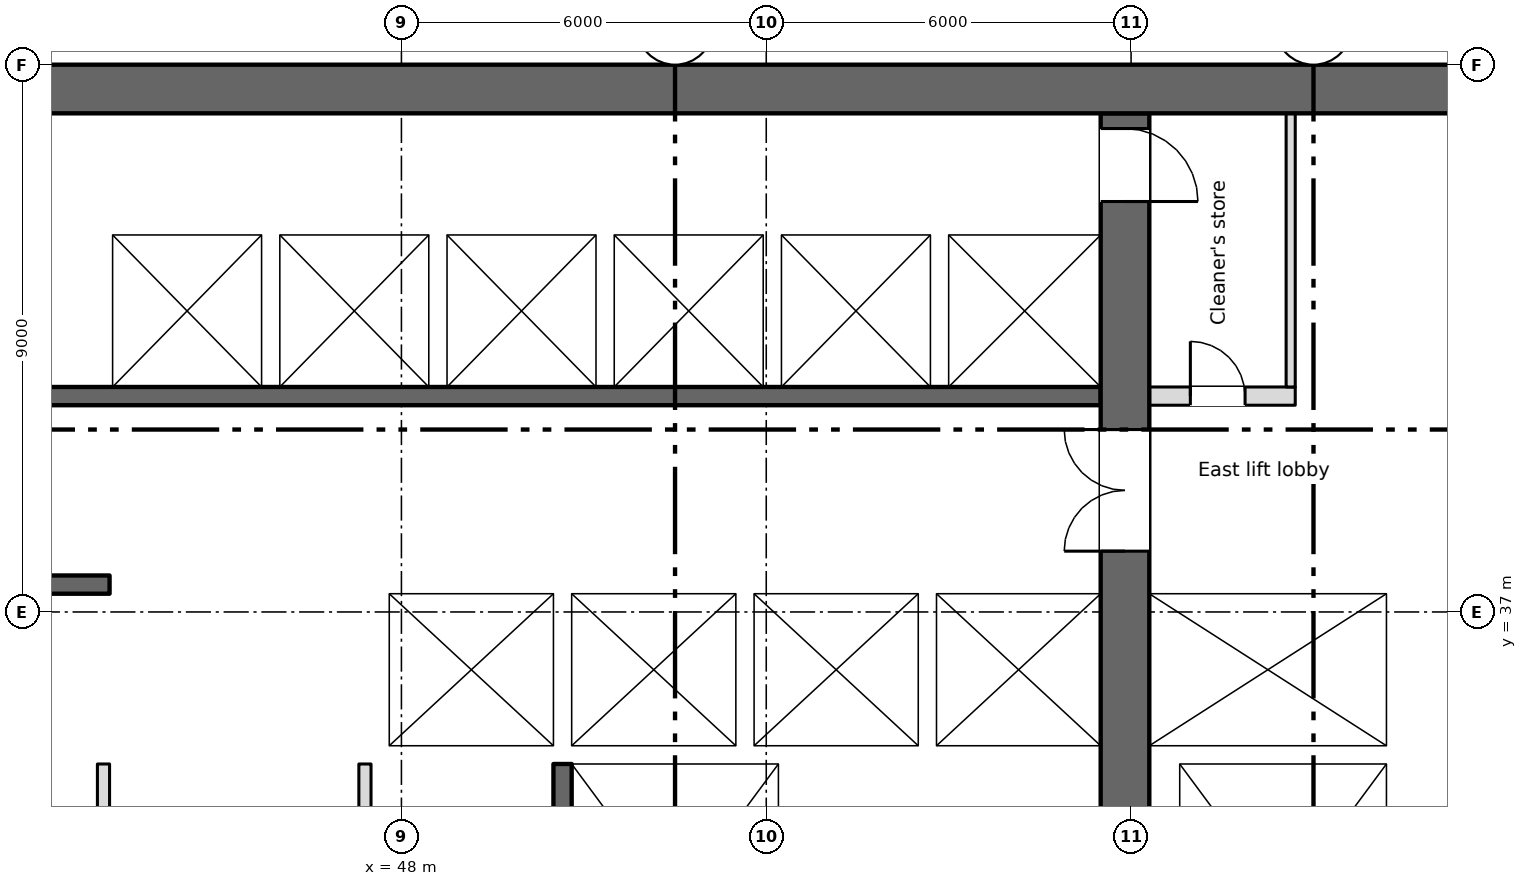
"""IFC4 building model, lengths in metres.
Left out: names, types, materials, properties, quantities, classifications, styles, units other than length and angle.
Written with IfcOpenShell. Run it as: python <this file> out.ifc"""

import sys

from ifc_helpers import new_model, si_unit, direction, frame, frame_2d, origin, place, context, subcontext, project, spatial, rectangle, extrude, element, fill, save


model = new_model("IFC4")
c1 = context("Model", 3, precision=1e-05, world=origin(), true_north=direction((0.0, 1.0)))
c2 = subcontext(c1, "Body", "Model", "MODEL_VIEW")
j1 = project(units=[si_unit("LENGTHUNIT", "METRE"), si_unit("PLANEANGLEUNIT", "RADIAN")], contexts=[c1])
p1 = place(None, origin())
s1 = spatial("IfcSite", under=j1, at=p1, CompositionType="ELEMENT")
p2 = place(p1, origin())
s2 = spatial("IfcBuilding", under=s1, at=p2, CompositionType="ELEMENT")
p3 = place(p2, frame((0.0, 0.0, 110.0)))
s3 = spatial("IfcBuildingStorey", under=s2, at=p3, CompositionType="ELEMENT", Elevation=110.0)
p4 = place(p3, frame((5.55, 45.6, 0.0), z_axis=(0.0, 0.0, 1.0), x_axis=(1.0, 0.0, 0.0)))
e1 = element("IfcWall", 1, at=p4, inside=s3, PredefinedType="SHEAR", context=c2, shape_type="SweptSolid", body=[
    extrude(rectangle(XDim=60.9, YDim=0.8, at=frame_2d((30.45, 0.0))), origin(), (0.0, 0.0, 1.0), 3.35),
])
p5 = place(p4, frame((1.2, 0.0, 0.6)))
e2 = element("IfcOpeningElement", 2, at=p5, cuts=e1, PredefinedType="OPENING", context=c2, shape_type="SweptSolid", body=[
    extrude(rectangle(XDim=0.6, YDim=2.4, at=frame_2d((0.3, 1.2))), frame((0.0, 0.41, 0.0), z_axis=(0.0, -1.0, 0.0), x_axis=(1.0, 0.0, 0.0)), (0.0, 0.0, 1.0), 0.82),
])
p6 = place(p4, frame((7.2, 0.0, 0.6)))
e3 = element("IfcOpeningElement", 3, at=p6, cuts=e1, PredefinedType="OPENING", context=c2, shape_type="SweptSolid", body=[
    extrude(rectangle(XDim=0.6, YDim=2.4, at=frame_2d((0.3, 1.2))), frame((0.0, 0.41, 0.0), z_axis=(0.0, -1.0, 0.0), x_axis=(1.0, 0.0, 0.0)), (0.0, 0.0, 1.0), 0.82),
])
p7 = place(p3, frame((64.35, 34.8, 0.0), z_axis=(0.0, 0.0, 1.0), x_axis=(0.0, 1.0, 0.0)))
e4 = element("IfcWall", 4, at=p7, inside=s3, PredefinedType="SHEAR", context=c2, shape_type="SweptSolid", body=[
    extrude(rectangle(XDim=10.4, YDim=0.3, at=frame_2d((5.2, 0.0))), origin(), (0.0, 0.0, 1.0), 3.35),
])
p8 = place(p3, frame((59.9, 28.4, 0.0), z_axis=(0.0, 0.0, 1.0), x_axis=(0.0, 1.0, 0.0)))
e5 = element("IfcWall", 5, at=p8, inside=s3, PredefinedType="SHEAR", context=c2, shape_type="SweptSolid", body=[
    extrude(rectangle(XDim=16.8, YDim=0.8, at=frame_2d((8.4, 0.0))), origin(), (0.0, 0.0, 1.0), 3.35),
])
p9 = place(p8, frame((9.6, 0.0, 0.0)))
e6 = element("IfcOpeningElement", 6, at=p9, cuts=e5, PredefinedType="OPENING", context=c2, shape_type="SweptSolid", body=[
    extrude(rectangle(XDim=2.0, YDim=2.1, at=frame_2d((1.0, 1.05))), frame((0.0, 0.41, 0.0), z_axis=(0.0, -1.0, 0.0), x_axis=(1.0, 0.0, 0.0)), (0.0, 0.0, 1.0), 0.82),
])
p10 = place(p8, frame((15.35, 0.0, 0.0)))
e7 = element("IfcOpeningElement", 7, at=p10, cuts=e5, PredefinedType="OPENING", context=c2, shape_type="SweptSolid", body=[
    extrude(rectangle(XDim=1.2, YDim=2.1, at=frame_2d((0.6, 1.05))), frame((0.0, 0.41, 0.0), z_axis=(0.0, -1.0, 0.0), x_axis=(1.0, 0.0, 0.0)), (0.0, 0.0, 1.0), 0.82),
])
p11 = place(p3, frame((50.65, 34.5, 0.0), z_axis=(0.0, 0.0, 1.0), x_axis=(0.0, -1.0, 0.0)))
e8 = element("IfcWall", 8, at=p11, inside=s3, PredefinedType="SHEAR", context=c2, shape_type="SweptSolid", body=[
    extrude(rectangle(XDim=6.1, YDim=0.3, at=frame_2d((3.05, 0.0))), origin(), (0.0, 0.0, 1.0), 3.35),
])
p12 = place(p11, frame((4.95, 0.0, 0.0)))
e9 = element("IfcOpeningElement", 9, at=p12, cuts=e8, PredefinedType="OPENING", context=c2, shape_type="SweptSolid", body=[
    extrude(rectangle(XDim=1.1, YDim=2.1, at=frame_2d((0.55, 1.05))), frame((0.0, 0.16, 0.0), z_axis=(0.0, -1.0, 0.0), x_axis=(1.0, 0.0, 0.0)), (0.0, 0.0, 1.0), 0.32),
])
p13 = place(p3, frame((54.35, 28.4, 0.0), z_axis=(0.0, 0.0, 1.0), x_axis=(0.0, 1.0, 0.0)))
e10 = element("IfcWall", 10, at=p13, inside=s3, PredefinedType="SHEAR", context=c2, shape_type="SweptSolid", body=[
    extrude(rectangle(XDim=6.1, YDim=0.3, at=frame_2d((3.05, 0.0))), origin(), (0.0, 0.0, 1.0), 3.35),
])
p14 = place(p3, frame((60.55, 28.4, 0.0), z_axis=(0.0, 0.0, 1.0), x_axis=(0.0, 1.0, 0.0)))
e11 = element("IfcWall", 11, at=p14, inside=s3, PredefinedType="SHEAR", context=c2, shape_type="SweptSolid", body=[
    extrude(rectangle(XDim=6.1, YDim=0.5, at=frame_2d((3.05, 0.0))), origin(), (0.0, 0.0, 1.0), 3.35),
])
p15 = place(p3, frame((64.35, 28.4, 0.0), z_axis=(0.0, 0.0, 1.0), x_axis=(0.0, 1.0, 0.0)))
e12 = element("IfcWall", 12, at=p15, inside=s3, PredefinedType="SHEAR", context=c2, shape_type="SweptSolid", body=[
    extrude(rectangle(XDim=6.1, YDim=0.3, at=frame_2d((3.05, 0.0))), origin(), (0.0, 0.0, 1.0), 3.35),
])
p16 = place(p3, frame((34.8, 34.65, 0.0), z_axis=(0.0, 0.0, 1.0), x_axis=(1.0, 0.0, 0.0)))
e13 = element("IfcWall", 13, at=p16, inside=s3, PredefinedType="SHEAR", context=c2, shape_type="SweptSolid", body=[
    extrude(rectangle(XDim=8.4, YDim=0.3, at=frame_2d((4.2, 0.0))), origin(), (0.0, 0.0, 1.0), 3.35),
])
p17 = place(p3, frame((47.3, 34.65, 0.0), z_axis=(0.0, 0.0, 1.0), x_axis=(1.0, 0.0, 0.0)))
e14 = element("IfcWall", 14, at=p17, inside=s3, PredefinedType="SHEAR", context=c2, shape_type="SweptSolid", body=[
    extrude(rectangle(XDim=12.2, YDim=0.3, at=frame_2d((6.1, 0.0))), origin(), (0.0, 0.0, 1.0), 3.35),
])
p18 = place(p17, frame((1.3, 0.0, 0.0)))
e15 = element("IfcOpeningElement", 15, at=p18, cuts=e14, PredefinedType="OPENING", context=c2, shape_type="SweptSolid", body=[
    extrude(rectangle(XDim=1.1, YDim=2.1, at=frame_2d((0.55, 1.05))), frame((0.0, 0.16, 0.0), z_axis=(0.0, -1.0, 0.0), x_axis=(1.0, 0.0, 0.0)), (0.0, 0.0, 1.0), 0.32),
])
p19 = place(p3, frame((60.3, 34.65, 0.0), z_axis=(0.0, 0.0, 1.0), x_axis=(1.0, 0.0, 0.0)))
e16 = element("IfcWall", 16, at=p19, inside=s3, PredefinedType="SHEAR", context=c2, shape_type="SweptSolid", body=[
    extrude(rectangle(XDim=4.2, YDim=0.3, at=frame_2d((2.1, 0.0))), origin(), (0.0, 0.0, 1.0), 3.35),
])
p20 = place(p3, frame((43.2, 37.45, 0.0), z_axis=(0.0, 0.0, 1.0), x_axis=(-1.0, 0.0, 0.0)))
e17 = element("IfcWall", 17, at=p20, inside=s3, PredefinedType="SHEAR", context=c2, shape_type="SweptSolid", body=[
    extrude(rectangle(XDim=8.4, YDim=0.3, at=frame_2d((4.2, 0.0))), origin(), (0.0, 0.0, 1.0), 3.35),
])
p21 = place(p20, frame((3.75, 0.0, 0.0)))
e18 = element("IfcOpeningElement", 18, at=p21, cuts=e17, PredefinedType="OPENING", context=c2, shape_type="SweptSolid", body=[
    extrude(rectangle(XDim=0.9, YDim=2.1, at=frame_2d((0.45, 1.05))), frame((0.0, 0.16, 0.0), z_axis=(0.0, -1.0, 0.0), x_axis=(1.0, 0.0, 0.0)), (0.0, 0.0, 1.0), 0.32),
])
p22 = place(p3, frame((47.3, 37.45, 0.0), z_axis=(0.0, 0.0, 1.0), x_axis=(1.0, 0.0, 0.0)))
e19 = element("IfcWall", 19, at=p22, inside=s3, PredefinedType="SHEAR", context=c2, shape_type="SweptSolid", body=[
    extrude(rectangle(XDim=12.2, YDim=0.3, at=frame_2d((6.1, 0.0))), origin(), (0.0, 0.0, 1.0), 3.35),
])
p23 = place(p22, frame((4.3, 0.0, 0.0)))
e20 = element("IfcOpeningElement", 20, at=p23, cuts=e19, PredefinedType="OPENING", context=c2, shape_type="SweptSolid", body=[
    extrude(rectangle(XDim=1.1, YDim=2.1, at=frame_2d((0.55, 1.05))), frame((0.0, 0.16, 0.0), z_axis=(0.0, -1.0, 0.0), x_axis=(1.0, 0.0, 0.0)), (0.0, 0.0, 1.0), 0.32),
])
p24 = place(p22, frame((7.3, 0.0, 0.0)))
e21 = element("IfcOpeningElement", 21, at=p24, cuts=e19, PredefinedType="OPENING", context=c2, shape_type="SweptSolid", body=[
    extrude(rectangle(XDim=1.1, YDim=2.1, at=frame_2d((0.55, 1.05))), frame((0.0, 0.16, 0.0), z_axis=(0.0, -1.0, 0.0), x_axis=(1.0, 0.0, 0.0)), (0.0, 0.0, 1.0), 0.32),
])
p25 = place(p22, frame((10.3, 0.0, 0.0)))
e22 = element("IfcOpeningElement", 22, at=p25, cuts=e19, PredefinedType="OPENING", context=c2, shape_type="SweptSolid", body=[
    extrude(rectangle(XDim=1.1, YDim=2.1, at=frame_2d((0.55, 1.05))), frame((0.0, 0.16, 0.0), z_axis=(0.0, -1.0, 0.0), x_axis=(1.0, 0.0, 0.0)), (0.0, 0.0, 1.0), 0.32),
])
p26 = place(p3, frame((60.3, 37.45, 0.0), z_axis=(0.0, 0.0, 1.0), x_axis=(1.0, 0.0, 0.0)))
e23 = element("IfcWall", 23, at=p26, inside=s3, PredefinedType="SHEAR", context=c2, shape_type="SweptSolid", body=[
    extrude(rectangle(XDim=3.9, YDim=0.3, at=frame_2d((1.95, 0.0))), origin(), (0.0, 0.0, 1.0), 3.35),
])
p27 = place(p26, frame((1.4, 0.0, 0.0)))
e24 = element("IfcOpeningElement", 24, at=p27, cuts=e23, PredefinedType="OPENING", context=c2, shape_type="SweptSolid", body=[
    extrude(rectangle(XDim=1.1, YDim=2.1, at=frame_2d((0.55, 1.05))), frame((0.0, 0.16, 0.0), z_axis=(0.0, -1.0, 0.0), x_axis=(1.0, 0.0, 0.0)), (0.0, 0.0, 1.0), 0.32),
])
p28 = place(p3, frame((43.05, 34.8, 0.0), z_axis=(0.0, 0.0, 1.0), x_axis=(0.0, 1.0, 0.0)))
e25 = element("IfcWall", 25, at=p28, inside=s3, PredefinedType="SHEAR", context=c2, shape_type="SweptSolid", body=[
    extrude(rectangle(XDim=2.5, YDim=0.3, at=frame_2d((1.25, 0.0))), origin(), (0.0, 0.0, 1.0), 3.35),
])
p29 = place(p3, frame((47.55, 34.8, 0.0), z_axis=(0.0, 0.0, 1.0), x_axis=(0.0, 1.0, 0.0)))
e26 = element("IfcWall", 26, at=p29, inside=s3, PredefinedType="SHEAR", context=c2, shape_type="SweptSolid", body=[
    extrude(rectangle(XDim=2.5, YDim=0.5, at=frame_2d((1.25, 0.0))), origin(), (0.0, 0.0, 1.0), 3.35),
])
p30 = place(p3, frame((50.65, 34.8, 0.0), z_axis=(0.0, 0.0, 1.0), x_axis=(0.0, 1.0, 0.0)))
e27 = element("IfcWall", 27, at=p30, inside=s3, PredefinedType="SHEAR", context=c2, shape_type="SweptSolid", body=[
    extrude(rectangle(XDim=2.5, YDim=0.3, at=frame_2d((1.25, 0.0))), origin(), (0.0, 0.0, 1.0), 3.35),
])
p31 = place(p3, frame((18.5, 40.55, 0.0), z_axis=(0.0, 0.0, 1.0), x_axis=(1.0, 0.0, 0.0)))
e28 = element("IfcWall", 28, at=p31, inside=s3, PredefinedType="SHEAR", context=c2, shape_type="SweptSolid", body=[
    extrude(rectangle(XDim=41.0, YDim=0.3, at=frame_2d((20.5, 0.0))), origin(), (0.0, 0.0, 1.0), 3.35),
])
p32 = place(p31, frame((15.9, 0.0, 0.0)))
e29 = element("IfcOpeningElement", 29, at=p32, cuts=e28, PredefinedType="OPENING", context=c2, shape_type="SweptSolid", body=[
    extrude(rectangle(XDim=0.9, YDim=2.1, at=frame_2d((0.45, 1.05))), frame((0.0, 0.16, 0.0), z_axis=(0.0, -1.0, 0.0), x_axis=(1.0, 0.0, 0.0)), (0.0, 0.0, 1.0), 0.32),
])
p33 = place(p31, frame((21.4, 0.0, 0.0)))
e30 = element("IfcOpeningElement", 30, at=p33, cuts=e28, PredefinedType="OPENING", context=c2, shape_type="SweptSolid", body=[
    extrude(rectangle(XDim=0.9, YDim=2.1, at=frame_2d((0.45, 1.05))), frame((0.0, 0.16, 0.0), z_axis=(0.0, -1.0, 0.0), x_axis=(1.0, 0.0, 0.0)), (0.0, 0.0, 1.0), 0.32),
])
p34 = place(p31, frame((6.175, 0.0, 0.0)))
e31 = element("IfcOpeningElement", 31, at=p34, cuts=e28, PredefinedType="OPENING", context=c2, shape_type="SweptSolid", body=[
    extrude(rectangle(XDim=1.1, YDim=2.1, at=frame_2d((0.55, 1.05))), frame((0.0, 0.16, 0.0), z_axis=(0.0, -1.0, 0.0), x_axis=(1.0, 0.0, 0.0)), (0.0, 0.0, 1.0), 0.32),
])
p35 = place(p31, frame((8.925, 0.0, 0.0)))
e32 = element("IfcOpeningElement", 32, at=p35, cuts=e28, PredefinedType="OPENING", context=c2, shape_type="SweptSolid", body=[
    extrude(rectangle(XDim=1.1, YDim=2.1, at=frame_2d((0.55, 1.05))), frame((0.0, 0.16, 0.0), z_axis=(0.0, -1.0, 0.0), x_axis=(1.0, 0.0, 0.0)), (0.0, 0.0, 1.0), 0.32),
])
p36 = place(p31, frame((11.675, 0.0, 0.0)))
e33 = element("IfcOpeningElement", 33, at=p36, cuts=e28, PredefinedType="OPENING", context=c2, shape_type="SweptSolid", body=[
    extrude(rectangle(XDim=1.1, YDim=2.1, at=frame_2d((0.55, 1.05))), frame((0.0, 0.16, 0.0), z_axis=(0.0, -1.0, 0.0), x_axis=(1.0, 0.0, 0.0)), (0.0, 0.0, 1.0), 0.32),
])
p37 = place(p31, frame((30.925, 0.0, 0.0)))
e34 = element("IfcOpeningElement", 34, at=p37, cuts=e28, PredefinedType="OPENING", context=c2, shape_type="SweptSolid", body=[
    extrude(rectangle(XDim=1.1, YDim=2.1, at=frame_2d((0.55, 1.05))), frame((0.0, 0.16, 0.0), z_axis=(0.0, -1.0, 0.0), x_axis=(1.0, 0.0, 0.0)), (0.0, 0.0, 1.0), 0.32),
])
p38 = place(p31, frame((33.675, 0.0, 0.0)))
e35 = element("IfcOpeningElement", 35, at=p38, cuts=e28, PredefinedType="OPENING", context=c2, shape_type="SweptSolid", body=[
    extrude(rectangle(XDim=1.1, YDim=2.1, at=frame_2d((0.55, 1.05))), frame((0.0, 0.16, 0.0), z_axis=(0.0, -1.0, 0.0), x_axis=(1.0, 0.0, 0.0)), (0.0, 0.0, 1.0), 0.32),
])
p39 = place(p31, frame((36.375, 0.0, 0.0)))
e36 = element("IfcOpeningElement", 36, at=p39, cuts=e28, PredefinedType="OPENING", context=c2, shape_type="SweptSolid", body=[
    extrude(rectangle(XDim=1.2, YDim=2.1, at=frame_2d((0.6, 1.05))), frame((0.0, 0.16, 0.0), z_axis=(0.0, -1.0, 0.0), x_axis=(1.0, 0.0, 0.0)), (0.0, 0.0, 1.0), 0.32),
])
p40 = place(p31, frame((39.15, 0.0, 0.0)))
e37 = element("IfcOpeningElement", 37, at=p40, cuts=e28, PredefinedType="OPENING", context=c2, shape_type="SweptSolid", body=[
    extrude(rectangle(XDim=1.2, YDim=2.1, at=frame_2d((0.6, 1.05))), frame((0.0, 0.16, 0.0), z_axis=(0.0, -1.0, 0.0), x_axis=(1.0, 0.0, 0.0)), (0.0, 0.0, 1.0), 0.32),
])
p41 = place(p3, frame((18.5, 43.35, 0.0), z_axis=(0.0, 0.0, 1.0), x_axis=(1.0, 0.0, 0.0)))
e38 = element("IfcWall", 38, at=p41, inside=s3, PredefinedType="SHEAR", context=c2, shape_type="SweptSolid", body=[
    extrude(rectangle(XDim=41.0, YDim=0.3, at=frame_2d((20.5, 0.0))), origin(), (0.0, 0.0, 1.0), 3.35),
])
p42 = place(p3, frame((60.3, 40.55, 0.0), z_axis=(0.0, 0.0, 1.0), x_axis=(1.0, 0.0, 0.0)))
e39 = element("IfcWall", 39, at=p42, inside=s3, PredefinedType="PARTITIONING", context=c2, shape_type="SweptSolid", body=[
    extrude(rectangle(XDim=2.4, YDim=0.3, at=frame_2d((1.2, 0.0))), origin(), (0.0, 0.0, 1.0), 3.35),
])
p43 = place(p42, frame((0.675, 0.0, 0.0)))
e40 = element("IfcOpeningElement", 40, at=p43, cuts=e39, PredefinedType="OPENING", context=c2, shape_type="SweptSolid", body=[
    extrude(rectangle(XDim=0.9, YDim=2.1, at=frame_2d((0.45, 1.05))), frame((0.0, 0.16, 0.0), z_axis=(0.0, -1.0, 0.0), x_axis=(1.0, 0.0, 0.0)), (0.0, 0.0, 1.0), 0.32),
])
for number, where, z_axis, x_axis in (
    (41, (53.65, 34.8, 0.0), (0.0, 0.0, 1.0), (0.0, 1.0, 0.0)),
    (42, (56.65, 34.8, 0.0), (0.0, 0.0, 1.0), (0.0, 1.0, 0.0)),
    (43, (43.1, 40.7, 0.0), (0.0, 0.0, 1.0), (0.0, 1.0, 0.0)),
    (44, (45.85, 40.7, 0.0), (0.0, 0.0, 1.0), (0.0, 1.0, 0.0)),
    (45, (48.6, 40.7, 0.0), (0.0, 0.0, 1.0), (0.0, 1.0, 0.0)),
    (46, (51.35, 40.7, 0.0), (0.0, 0.0, 1.0), (0.0, 1.0, 0.0)),
    (47, (54.1, 40.7, 0.0), (0.0, 0.0, 1.0), (0.0, 1.0, 0.0)),
    (48, (56.85, 40.7, 0.0), (0.0, 0.0, 1.0), (0.0, 1.0, 0.0)),
):
    element("IfcWall", number, at=place(p3, frame(where, z_axis=z_axis, x_axis=x_axis)), inside=s3, PredefinedType="SHEAR", context=c2, shape_type="SweptSolid", body=[
        extrude(rectangle(XDim=2.5, YDim=0.3, at=frame_2d((1.25, 0.0))), origin(), (0.0, 0.0, 1.0), 3.35),
    ])
for number, where, z_axis, x_axis in (
    (49, (43.1, 28.4, 0.0), (0.0, 0.0, 1.0), (0.0, 1.0, 0.0)),
    (50, (47.4, 28.4, 0.0), (0.0, 0.0, 1.0), (0.0, 1.0, 0.0)),
):
    element("IfcWall", number, at=place(p3, frame(where, z_axis=z_axis, x_axis=x_axis)), inside=s3, PredefinedType="PARTITIONING", context=c2, shape_type="SweptSolid", body=[
        extrude(rectangle(XDim=6.1, YDim=0.2, at=frame_2d((3.05, 0.0))), origin(), (0.0, 0.0, 1.0), 3.35),
    ])
p44 = place(p3, frame((62.625, 40.7, 0.0), z_axis=(0.0, 0.0, 1.0), x_axis=(0.0, 1.0, 0.0)))
e51 = element("IfcWall", 51, at=p44, inside=s3, PredefinedType="PARTITIONING", context=c2, shape_type="SweptSolid", body=[
    extrude(rectangle(XDim=4.5, YDim=0.15, at=frame_2d((2.25, 0.0))), origin(), (0.0, 0.0, 1.0), 3.35),
])
p45 = place(p43, origin())
e52 = element("IfcDoor", 52, at=p45, inside=s3, OperationType="SINGLE_SWING_LEFT", PredefinedType="DOOR", context=c2, shape_type="SweptSolid", body=[
    extrude(rectangle(XDim=0.9, YDim=2.1, at=frame_2d((0.45, 1.05))), frame((0.0, 0.025, 0.0), z_axis=(0.0, -1.0, 0.0), x_axis=(1.0, 0.0, 0.0)), (0.0, 0.0, 1.0), 0.05),
])
fill(e40, e52)
p46 = place(p23, origin())
e53 = element("IfcDoor", 53, at=p46, inside=s3, OperationType="SLIDING_TO_LEFT", PredefinedType="DOOR", context=c2, shape_type="SweptSolid", body=[
    extrude(rectangle(XDim=1.1, YDim=2.1, at=frame_2d((0.55, 1.05))), frame((0.0, 0.025, 0.0), z_axis=(0.0, -1.0, 0.0), x_axis=(1.0, 0.0, 0.0)), (0.0, 0.0, 1.0), 0.05),
])
fill(e20, e53)
p47 = place(p24, origin())
e54 = element("IfcDoor", 54, at=p47, inside=s3, OperationType="SLIDING_TO_LEFT", PredefinedType="DOOR", context=c2, shape_type="SweptSolid", body=[
    extrude(rectangle(XDim=1.1, YDim=2.1, at=frame_2d((0.55, 1.05))), frame((0.0, 0.025, 0.0), z_axis=(0.0, -1.0, 0.0), x_axis=(1.0, 0.0, 0.0)), (0.0, 0.0, 1.0), 0.05),
])
fill(e21, e54)
p48 = place(p25, origin())
e55 = element("IfcDoor", 55, at=p48, inside=s3, OperationType="SLIDING_TO_LEFT", PredefinedType="DOOR", context=c2, shape_type="SweptSolid", body=[
    extrude(rectangle(XDim=1.1, YDim=2.1, at=frame_2d((0.55, 1.05))), frame((0.0, 0.025, 0.0), z_axis=(0.0, -1.0, 0.0), x_axis=(1.0, 0.0, 0.0)), (0.0, 0.0, 1.0), 0.05),
])
fill(e22, e55)
p49 = place(p37, origin())
e56 = element("IfcDoor", 56, at=p49, inside=s3, OperationType="SLIDING_TO_LEFT", PredefinedType="DOOR", context=c2, shape_type="SweptSolid", body=[
    extrude(rectangle(XDim=1.1, YDim=2.1, at=frame_2d((0.55, 1.05))), frame((0.0, 0.025, 0.0), z_axis=(0.0, -1.0, 0.0), x_axis=(1.0, 0.0, 0.0)), (0.0, 0.0, 1.0), 0.05),
])
fill(e34, e56)
p50 = place(p38, origin())
e57 = element("IfcDoor", 57, at=p50, inside=s3, OperationType="SLIDING_TO_LEFT", PredefinedType="DOOR", context=c2, shape_type="SweptSolid", body=[
    extrude(rectangle(XDim=1.1, YDim=2.1, at=frame_2d((0.55, 1.05))), frame((0.0, 0.025, 0.0), z_axis=(0.0, -1.0, 0.0), x_axis=(1.0, 0.0, 0.0)), (0.0, 0.0, 1.0), 0.05),
])
fill(e35, e57)
p51 = place(p39, origin())
e58 = element("IfcDoor", 58, at=p51, inside=s3, OperationType="SLIDING_TO_LEFT", PredefinedType="DOOR", context=c2, shape_type="SweptSolid", body=[
    extrude(rectangle(XDim=1.2, YDim=2.1, at=frame_2d((0.6, 1.05))), frame((0.0, 0.025, 0.0), z_axis=(0.0, -1.0, 0.0), x_axis=(1.0, 0.0, 0.0)), (0.0, 0.0, 1.0), 0.05),
])
fill(e36, e58)
p52 = place(p40, origin())
e59 = element("IfcDoor", 59, at=p52, inside=s3, OperationType="SLIDING_TO_LEFT", PredefinedType="DOOR", context=c2, shape_type="SweptSolid", body=[
    extrude(rectangle(XDim=1.2, YDim=2.1, at=frame_2d((0.6, 1.05))), frame((0.0, 0.025, 0.0), z_axis=(0.0, -1.0, 0.0), x_axis=(1.0, 0.0, 0.0)), (0.0, 0.0, 1.0), 0.05),
])
fill(e37, e59)
p53 = place(p27, origin())
e60 = element("IfcDoor", 60, at=p53, inside=s3, OperationType="SLIDING_TO_LEFT", PredefinedType="DOOR", context=c2, shape_type="SweptSolid", body=[
    extrude(rectangle(XDim=1.1, YDim=2.1, at=frame_2d((0.55, 1.05))), frame((0.0, 0.025, 0.0), z_axis=(0.0, -1.0, 0.0), x_axis=(1.0, 0.0, 0.0)), (0.0, 0.0, 1.0), 0.05),
])
fill(e24, e60)
p54 = place(p18, origin())
e61 = element("IfcDoor", 61, at=p54, inside=s3, OperationType="SLIDING_TO_LEFT", PredefinedType="DOOR", context=c2, shape_type="SweptSolid", body=[
    extrude(rectangle(XDim=1.1, YDim=2.1, at=frame_2d((0.55, 1.05))), frame((0.0, 0.025, 0.0), z_axis=(0.0, -1.0, 0.0), x_axis=(1.0, 0.0, 0.0)), (0.0, 0.0, 1.0), 0.05),
])
fill(e15, e61)
p55 = place(p9, origin())
e62 = element("IfcDoor", 62, at=p55, inside=s3, OperationType="DOUBLE_DOOR_SINGLE_SWING", PredefinedType="DOOR", context=c2, shape_type="SweptSolid", body=[
    extrude(rectangle(XDim=2.0, YDim=2.1, at=frame_2d((1.0, 1.05))), frame((0.0, 0.025, 0.0), z_axis=(0.0, -1.0, 0.0), x_axis=(1.0, 0.0, 0.0)), (0.0, 0.0, 1.0), 0.05),
])
fill(e6, e62)
p56 = place(p10, origin())
e63 = element("IfcDoor", 63, at=p56, inside=s3, OperationType="SINGLE_SWING_LEFT", PredefinedType="DOOR", context=c2, shape_type="SweptSolid", body=[
    extrude(rectangle(XDim=1.2, YDim=2.1, at=frame_2d((0.6, 1.05))), frame((0.0, 0.025, 0.0), z_axis=(0.0, -1.0, 0.0), x_axis=(1.0, 0.0, 0.0)), (0.0, 0.0, 1.0), 0.05),
])
fill(e7, e63)
save(model, sys.argv[1])
